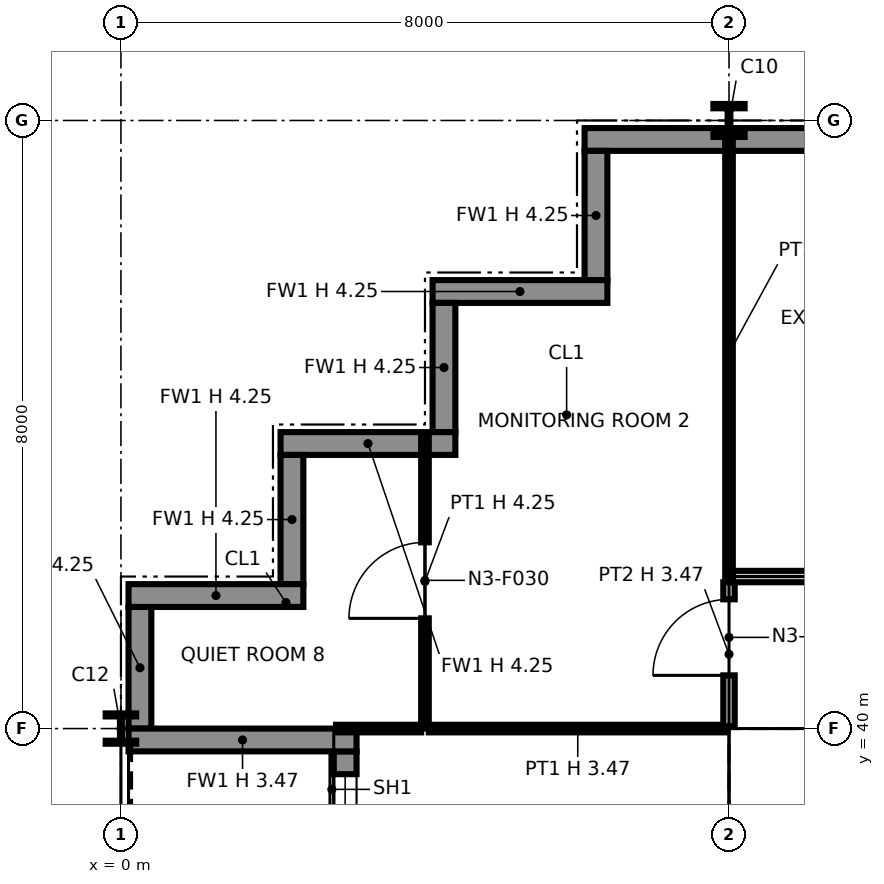
"""IFC4 building model, lengths in metres.
Left out: names, types, materials, properties, quantities, classifications, styles, units other than length and angle.
Written with IfcOpenShell. Run it as: python <this file> out.ifc"""

import sys

from ifc_helpers import new_model, si_unit, direction, frame, frame_2d, origin, origin_2d, place, context, subcontext, project, spatial, polyline, rectangle, i_section, outline, extrude, element, fill, save


model = new_model("IFC4")
c1 = context("Model", 3, precision=1e-05, world=origin(), true_north=direction((0.0, 1.0)))
c2 = subcontext(c1, "Body", "Model", "MODEL_VIEW")
j1 = project(units=[si_unit("LENGTHUNIT", "METRE"), si_unit("PLANEANGLEUNIT", "RADIAN")], contexts=[c1])
p1 = place(None, origin())
s1 = spatial("IfcSite", under=j1, at=p1, CompositionType="ELEMENT")
p2 = place(p1, origin())
s2 = spatial("IfcBuilding", under=s1, at=p2, CompositionType="ELEMENT")
p3 = place(p2, frame((0.0, 0.0, 70.0)))
s3 = spatial("IfcBuildingStorey", under=s2, at=p3, CompositionType="ELEMENT", Elevation=70.0)
p4 = place(p3, frame((0.0, 40.0, 0.0), z_axis=(0.0, 0.0, 1.0), x_axis=(1.0, 0.0, 0.0)))
e1 = element("IfcColumn", 1, at=p4, inside=s3, PredefinedType="COLUMN", context=c2, shape_type="SweptSolid", body=[
    extrude(i_section(OverallWidth=0.401, OverallDepth=0.399, WebThickness=0.025, FlangeThickness=0.04, at=origin_2d()), origin(), (0.0, 0.0, 1.0), 4.25),
])
p5 = place(p3, frame((8.0, 40.0, 0.0), z_axis=(0.0, 0.0, 1.0), x_axis=(1.0, 0.0, 0.0)))
e2 = element("IfcColumn", 2, at=p5, inside=s3, PredefinedType="COLUMN", context=c2, shape_type="SweptSolid", body=[
    extrude(i_section(OverallWidth=0.394, OverallDepth=0.376, WebThickness=0.017, FlangeThickness=0.028, at=origin_2d()), origin(), (0.0, 0.0, 1.0), 4.25),
])
p6 = place(p3, frame((8.0, 48.0, 0.0), z_axis=(0.0, 0.0, 1.0), x_axis=(1.0, 0.0, 0.0)))
e3 = element("IfcColumn", 3, at=p6, inside=s3, PredefinedType="COLUMN", context=c2, shape_type="SweptSolid", body=[
    extrude(i_section(OverallWidth=0.411, OverallDepth=0.434, WebThickness=0.036, FlangeThickness=0.057, at=origin_2d()), origin(), (0.0, 0.0, 1.0), 4.25),
])
p7 = place(p3, frame((0.25, 41.6, 0.0), z_axis=(0.0, 0.0, 1.0), x_axis=(0.0, -1.0, 0.0)))
e4 = element("IfcWall", 4, at=p7, inside=s3, PredefinedType="SOLIDWALL", context=c2, shape_type="SweptSolid", body=[
    extrude(rectangle(XDim=1.6, YDim=0.3, at=frame_2d((0.8, 0.0))), origin(), (0.0, 0.0, 1.0), 4.25),
])
p8 = place(p3, frame((2.95, 39.7, 0.0), z_axis=(0.0, 0.0, 1.0), x_axis=(0.0, -1.0, 0.0)))
e5 = element("IfcWall", 5, at=p8, inside=s3, PredefinedType="SOLIDWALL", context=c2, shape_type="SweptSolid", body=[
    extrude(rectangle(XDim=7.4, YDim=0.3, at=frame_2d((3.7, 0.0))), origin(), (0.0, 0.0, 1.0), 4.25),
])
p9 = place(p8, frame((0.3, 0.0, 0.9)))
e6 = element("IfcOpeningElement", 6, at=p9, cuts=e5, PredefinedType="OPENING", context=c2, shape_type="SweptSolid", body=[
    extrude(rectangle(XDim=2.8, YDim=2.2, at=frame_2d((1.4, 1.1))), frame((0.0, 0.16, 0.0), z_axis=(0.0, -1.0, 0.0), x_axis=(1.0, 0.0, 0.0)), (0.0, 0.0, 1.0), 0.32),
])
p10 = place(p8, frame((4.7, 0.0, 0.0)))
e7 = element("IfcOpeningElement", 7, at=p10, cuts=e5, PredefinedType="OPENING", context=c2, shape_type="SweptSolid", body=[
    extrude(rectangle(XDim=2.0, YDim=2.4, at=frame_2d((1.0, 1.2))), frame((0.0, 0.16, 0.0), z_axis=(0.0, -1.0, 0.0), x_axis=(1.0, 0.0, 0.0)), (0.0, 0.0, 1.0), 0.32),
])
p11 = place(p3, frame((0.1, 39.85, 0.0), z_axis=(0.0, 0.0, 1.0), x_axis=(1.0, 0.0, 0.0)))
e8 = element("IfcWall", 8, at=p11, inside=s3, PredefinedType="SOLIDWALL", context=c2, shape_type="SweptSolid", body=[
    extrude(rectangle(XDim=3.0, YDim=0.3, at=frame_2d((1.5, 0.0))), origin(), (0.0, 0.0, 1.0), 3.469),
])
p12 = place(p3, frame((16.0, 47.75, 0.0), z_axis=(0.0, 0.0, 1.0), x_axis=(-1.0, 0.0, 0.0)))
e9 = element("IfcWall", 9, at=p12, inside=s3, PredefinedType="SOLIDWALL", context=c2, shape_type="SweptSolid", body=[
    extrude(rectangle(XDim=9.9, YDim=0.3, at=frame_2d((4.95, 0.0))), origin(), (0.0, 0.0, 1.0), 4.25),
])
p13 = place(p3, frame((6.25, 47.6, 0.0), z_axis=(0.0, 0.0, 1.0), x_axis=(0.0, -1.0, 0.0)))
e10 = element("IfcWall", 10, at=p13, inside=s3, PredefinedType="SOLIDWALL", context=c2, shape_type="SweptSolid", body=[
    extrude(rectangle(XDim=1.7, YDim=0.3, at=frame_2d((0.85, 0.0))), origin(), (0.0, 0.0, 1.0), 4.25),
])
p14 = place(p3, frame((6.4, 45.75, 0.0), z_axis=(0.0, 0.0, 1.0), x_axis=(-1.0, 0.0, 0.0)))
e11 = element("IfcWall", 11, at=p14, inside=s3, PredefinedType="SOLIDWALL", context=c2, shape_type="SweptSolid", body=[
    extrude(rectangle(XDim=2.3, YDim=0.3, at=frame_2d((1.15, 0.0))), origin(), (0.0, 0.0, 1.0), 4.25),
])
p15 = place(p3, frame((4.25, 45.6, 0.0), z_axis=(0.0, 0.0, 1.0), x_axis=(0.0, -1.0, 0.0)))
e12 = element("IfcWall", 12, at=p15, inside=s3, PredefinedType="SOLIDWALL", context=c2, shape_type="SweptSolid", body=[
    extrude(rectangle(XDim=1.7, YDim=0.3, at=frame_2d((0.85, 0.0))), origin(), (0.0, 0.0, 1.0), 4.25),
])
p16 = place(p3, frame((4.4, 43.75, 0.0), z_axis=(0.0, 0.0, 1.0), x_axis=(-1.0, 0.0, 0.0)))
e13 = element("IfcWall", 13, at=p16, inside=s3, PredefinedType="SOLIDWALL", context=c2, shape_type="SweptSolid", body=[
    extrude(rectangle(XDim=2.3, YDim=0.3, at=frame_2d((1.15, 0.0))), origin(), (0.0, 0.0, 1.0), 4.25),
])
p17 = place(p3, frame((2.25, 43.6, 0.0), z_axis=(0.0, 0.0, 1.0), x_axis=(0.0, -1.0, 0.0)))
e14 = element("IfcWall", 14, at=p17, inside=s3, PredefinedType="SOLIDWALL", context=c2, shape_type="SweptSolid", body=[
    extrude(rectangle(XDim=1.7, YDim=0.3, at=frame_2d((0.85, 0.0))), origin(), (0.0, 0.0, 1.0), 4.25),
])
p18 = place(p3, frame((2.4, 41.75, 0.0), z_axis=(0.0, 0.0, 1.0), x_axis=(-1.0, 0.0, 0.0)))
e15 = element("IfcWall", 15, at=p18, inside=s3, PredefinedType="SOLIDWALL", context=c2, shape_type="SweptSolid", body=[
    extrude(rectangle(XDim=2.3, YDim=0.3, at=frame_2d((1.15, 0.0))), origin(), (0.0, 0.0, 1.0), 4.25),
])
p19 = place(p3, frame((8.75, 32.85, 0.0), z_axis=(0.0, 0.0, 1.0), x_axis=(0.0, 1.0, 0.0)))
e16 = element("IfcWall", 16, at=p19, inside=s3, PredefinedType="PARTITIONING", context=c2, shape_type="SweptSolid", body=[
    extrude(outline(polyline([(0.0, 0.0), (6.3, 0.0), (6.3, 4.25), (3.231, 4.25), (3.23, 3.789), (3.07, 3.789), (3.069, 4.25), (0.0, 4.25), (0.0, 0.0)])), frame((0.0, 0.1, 0.0), z_axis=(0.0, -1.0, 0.0), x_axis=(1.0, 0.0, 0.0)), (0.0, 0.0, 1.0), 0.2),
])
p20 = place(p3, frame((8.65, 39.25, 0.0), z_axis=(0.0, 0.0, 1.0), x_axis=(1.0, 0.0, 0.0)))
e17 = element("IfcWall", 17, at=p20, inside=s3, PredefinedType="PARTITIONING", context=c2, shape_type="SweptSolid", body=[
    extrude(outline(polyline([(0.0, 0.0), (14.7, 0.0), (14.7, 4.25), (7.469, 4.25), (7.469, 3.632), (7.231, 3.632), (7.23, 4.25), (0.0, 4.25), (0.0, 0.0)])), frame((0.0, 0.1, 0.0), z_axis=(0.0, -1.0, 0.0), x_axis=(1.0, 0.0, 0.0)), (0.0, 0.0, 1.0), 0.2),
])
p21 = place(p3, frame((2.83, 40.0, 0.0), z_axis=(0.0, 0.0, 1.0), x_axis=(1.0, 0.0, 0.0)))
e18 = element("IfcWall", 18, at=p21, inside=s3, PredefinedType="PARTITIONING", context=c2, shape_type="SweptSolid", body=[
    extrude(rectangle(XDim=1.12, YDim=0.1, at=frame_2d((0.56, 0.0))), origin(), (0.0, 0.0, 1.0), 3.47),
])
p22 = place(p3, frame((4.05, 40.0, 0.0), z_axis=(0.0, 0.0, 1.0), x_axis=(1.0, 0.0, 0.0)))
e19 = element("IfcWall", 19, at=p22, inside=s3, PredefinedType="PARTITIONING", context=c2, shape_type="SweptSolid", body=[
    extrude(rectangle(XDim=3.92, YDim=0.1, at=frame_2d((1.96, 0.0))), origin(), (0.0, 0.0, 1.0), 3.47),
])
p23 = place(p3, frame((4.0, 40.0, 0.0), z_axis=(0.0, 0.0, 1.0), x_axis=(0.0, 1.0, 0.0)))
e20 = element("IfcWall", 20, at=p23, inside=s3, PredefinedType="PARTITIONING", context=c2, shape_type="SweptSolid", body=[
    extrude(rectangle(XDim=3.87, YDim=0.1, at=frame_2d((1.935, 0.0))), origin(), (0.0, 0.0, 1.0), 4.25),
])
p24 = place(p23, frame((1.45, 0.0, 0.0)))
e21 = element("IfcOpeningElement", 21, at=p24, cuts=e20, PredefinedType="OPENING", context=c2, shape_type="SweptSolid", body=[
    extrude(rectangle(XDim=1.0, YDim=2.1, at=frame_2d((0.5, 1.05))), frame((0.0, 0.06, 0.0), z_axis=(0.0, -1.0, 0.0), x_axis=(1.0, 0.0, 0.0)), (0.0, 0.0, 1.0), 0.12),
])
p25 = place(p3, frame((8.0, 40.03, 0.0), z_axis=(0.0, 0.0, 1.0), x_axis=(0.0, 1.0, 0.0)))
e22 = element("IfcWall", 22, at=p25, inside=s3, PredefinedType="PARTITIONING", context=c2, shape_type="SweptSolid", body=[
    extrude(rectangle(XDim=1.895, YDim=0.15, at=frame_2d((0.948, 0.0))), origin(), (0.0, 0.0, 1.0), 3.47),
])
p26 = place(p25, frame((0.67, 0.0, 0.0)))
e23 = element("IfcOpeningElement", 23, at=p26, cuts=e22, PredefinedType="OPENING", context=c2, shape_type="SweptSolid", body=[
    extrude(rectangle(XDim=1.0, YDim=2.1, at=frame_2d((0.5, 1.05))), frame((0.0, 0.085, 0.0), z_axis=(0.0, -1.0, 0.0), x_axis=(1.0, 0.0, 0.0)), (0.0, 0.0, 1.0), 0.17),
])
p27 = place(p3, frame((8.05, 42.0, 0.0), z_axis=(0.0, 0.0, 1.0), x_axis=(1.0, 0.0, 0.0)))
e24 = element("IfcWall", 24, at=p27, inside=s3, PredefinedType="PARTITIONING", context=c2, shape_type="SweptSolid", body=[
    extrude(rectangle(XDim=33.95, YDim=0.15, at=frame_2d((16.975, 0.0))), origin(), (0.0, 0.0, 1.0), 4.25),
])
p28 = place(p27, frame((9.45, 0.0, 0.0)))
e25 = element("IfcOpeningElement", 25, at=p28, cuts=e24, PredefinedType="OPENING", context=c2, shape_type="SweptSolid", body=[
    extrude(rectangle(XDim=1.0, YDim=2.1, at=frame_2d((0.5, 1.05))), frame((0.0, 0.085, 0.0), z_axis=(0.0, -1.0, 0.0), x_axis=(1.0, 0.0, 0.0)), (0.0, 0.0, 1.0), 0.17),
])
p29 = place(p27, frame((13.45, 0.0, 0.0)))
e26 = element("IfcOpeningElement", 26, at=p29, cuts=e24, PredefinedType="OPENING", context=c2, shape_type="SweptSolid", body=[
    extrude(rectangle(XDim=1.0, YDim=2.1, at=frame_2d((0.5, 1.05))), frame((0.0, 0.085, 0.0), z_axis=(0.0, -1.0, 0.0), x_axis=(1.0, 0.0, 0.0)), (0.0, 0.0, 1.0), 0.17),
])
p30 = place(p27, frame((27.45, 0.0, 0.0)))
e27 = element("IfcOpeningElement", 27, at=p30, cuts=e24, PredefinedType="OPENING", context=c2, shape_type="SweptSolid", body=[
    extrude(rectangle(XDim=1.0, YDim=2.1, at=frame_2d((0.5, 1.05))), frame((0.0, 0.085, 0.0), z_axis=(0.0, -1.0, 0.0), x_axis=(1.0, 0.0, 0.0)), (0.0, 0.0, 1.0), 0.17),
])
p31 = place(p27, frame((1.45, 0.0, 0.0)))
e28 = element("IfcOpeningElement", 28, at=p31, cuts=e24, PredefinedType="OPENING", context=c2, shape_type="SweptSolid", body=[
    extrude(rectangle(XDim=1.0, YDim=2.1, at=frame_2d((0.5, 1.05))), frame((0.0, 0.085, 0.0), z_axis=(0.0, -1.0, 0.0), x_axis=(1.0, 0.0, 0.0)), (0.0, 0.0, 1.0), 0.17),
])
p32 = place(p27, frame((5.45, 0.0, 0.0)))
e29 = element("IfcOpeningElement", 29, at=p32, cuts=e24, PredefinedType="OPENING", context=c2, shape_type="SweptSolid", body=[
    extrude(rectangle(XDim=1.0, YDim=2.1, at=frame_2d((0.5, 1.05))), frame((0.0, 0.085, 0.0), z_axis=(0.0, -1.0, 0.0), x_axis=(1.0, 0.0, 0.0)), (0.0, 0.0, 1.0), 0.17),
])
p33 = place(p27, frame((17.45, 0.0, 0.0)))
e30 = element("IfcOpeningElement", 30, at=p33, cuts=e24, PredefinedType="OPENING", context=c2, shape_type="SweptSolid", body=[
    extrude(rectangle(XDim=1.0, YDim=2.1, at=frame_2d((0.5, 1.05))), frame((0.0, 0.085, 0.0), z_axis=(0.0, -1.0, 0.0), x_axis=(1.0, 0.0, 0.0)), (0.0, 0.0, 1.0), 0.17),
])
p34 = place(p27, frame((21.45, 0.0, 0.0)))
e31 = element("IfcOpeningElement", 31, at=p34, cuts=e24, PredefinedType="OPENING", context=c2, shape_type="SweptSolid", body=[
    extrude(rectangle(XDim=1.0, YDim=2.1, at=frame_2d((0.5, 1.05))), frame((0.0, 0.085, 0.0), z_axis=(0.0, -1.0, 0.0), x_axis=(1.0, 0.0, 0.0)), (0.0, 0.0, 1.0), 0.17),
])
p35 = place(p3, frame((8.0, 42.0, 0.0), z_axis=(0.0, 0.0, 1.0), x_axis=(0.0, 1.0, 0.0)))
e32 = element("IfcWall", 32, at=p35, inside=s3, PredefinedType="PARTITIONING", context=c2, shape_type="SweptSolid", body=[
    extrude(rectangle(XDim=5.87, YDim=0.1, at=frame_2d((2.935, 0.0))), origin(), (0.0, 0.0, 1.0), 3.47),
])
p36 = place(p9, origin())
e33 = element("IfcWindow", 33, at=p36, inside=s3, PartitioningType="SINGLE_PANEL", PredefinedType="WINDOW", context=c2, shape_type="SweptSolid", body=[
    extrude(rectangle(XDim=2.8, YDim=2.2, at=frame_2d((1.4, 1.1))), frame((0.0, 0.03, 0.0), z_axis=(0.0, -1.0, 0.0), x_axis=(1.0, 0.0, 0.0)), (0.0, 0.0, 1.0), 0.06),
])
fill(e6, e33)
p37 = place(p26, origin())
e34 = element("IfcDoor", 34, at=p37, inside=s3, OperationType="SINGLE_SWING_LEFT", PredefinedType="DOOR", context=c2, shape_type="SweptSolid", body=[
    extrude(rectangle(XDim=1.0, YDim=2.1, at=frame_2d((0.5, 1.05))), frame((0.0, 0.025, 0.0), z_axis=(0.0, -1.0, 0.0), x_axis=(1.0, 0.0, 0.0)), (0.0, 0.0, 1.0), 0.05),
])
fill(e23, e34)
p38 = place(p24, origin())
e35 = element("IfcDoor", 35, at=p38, inside=s3, OperationType="SINGLE_SWING_LEFT", PredefinedType="DOOR", context=c2, shape_type="SweptSolid", body=[
    extrude(rectangle(XDim=1.0, YDim=2.1, at=frame_2d((0.5, 1.05))), frame((0.0, 0.025, 0.0), z_axis=(0.0, -1.0, 0.0), x_axis=(1.0, 0.0, 0.0)), (0.0, 0.0, 1.0), 0.05),
])
fill(e21, e35)
save(model, sys.argv[1])
